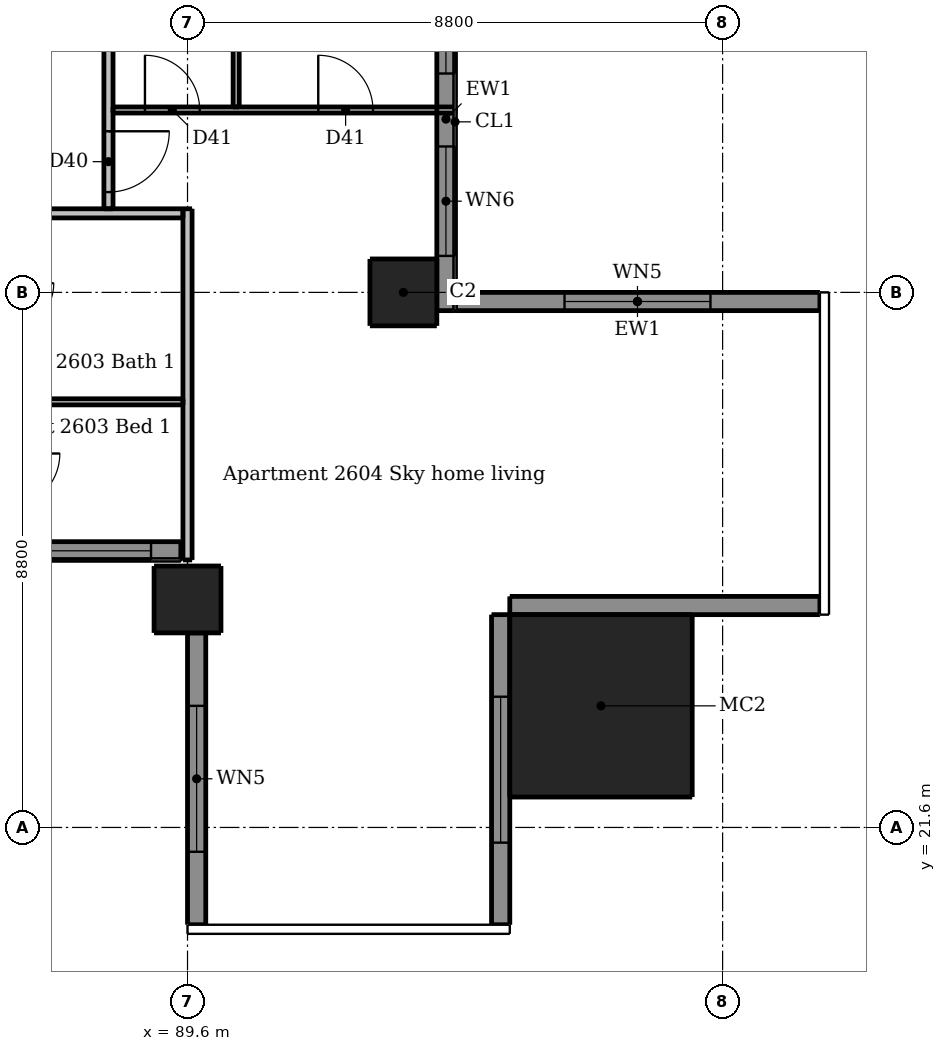
"""IFC4 building model, lengths in metres.
Left out: names, types, materials, properties, quantities, classifications, styles, units other than length and angle.
Written with IfcOpenShell. Run it as: python <this file> out.ifc"""

import sys

from ifc_helpers import new_model, si_unit, direction, frame, frame_2d, origin, origin_2d, place, context, subcontext, project, spatial, rectangle, extrude, element, fill, save


model = new_model("IFC4")
c1 = context("Model", 3, precision=1e-05, world=origin(), true_north=direction((0.0, 1.0)))
c2 = subcontext(c1, "Body", "Model", "MODEL_VIEW")
j1 = project(units=[si_unit("LENGTHUNIT", "METRE"), si_unit("PLANEANGLEUNIT", "RADIAN")], contexts=[c1])
p1 = place(None, origin())
s1 = spatial("IfcSite", under=j1, at=p1, CompositionType="ELEMENT")
p2 = place(p1, origin())
s2 = spatial("IfcBuilding", under=s1, at=p2, CompositionType="ELEMENT")
p3 = place(p2, frame((0.0, 0.0, 98.5)))
s3 = spatial("IfcBuildingStorey", under=s2, at=p3, CompositionType="ELEMENT", Elevation=98.5)
for number, where, z_axis, x_axis in (
    (1, (89.6, 25.35, 0.0), (0.0, 0.0, 1.0), (1.0, 0.0, 0.0)),
    (2, (93.15, 30.4, 0.0), (0.0, 0.0, 1.0), (1.0, 0.0, 0.0)),
):
    element("IfcColumn", number, at=place(p3, frame(where, z_axis=z_axis, x_axis=x_axis)), inside=s3, PredefinedType="COLUMN", context=c2, shape_type="SweptSolid", body=[
        extrude(rectangle(XDim=1.1, YDim=1.1, at=origin_2d()), origin(), (0.0, 0.0, 1.0), 3.05),
    ])
p4 = place(p3, frame((96.4, 23.6, 0.0), z_axis=(0.0, 0.0, 1.0), x_axis=(1.0, 0.0, 0.0)))
e3 = element("IfcColumn", 3, at=p4, inside=s3, PredefinedType="COLUMN", context=c2, shape_type="SweptSolid", body=[
    extrude(rectangle(XDim=3.0, YDim=3.0, at=origin_2d()), origin(), (0.0, 0.0, 1.0), 3.3),
])
p5 = place(p3, frame((89.75, 24.8, 0.0), z_axis=(0.0, 0.0, 1.0), x_axis=(0.0, -1.0, 0.0)))
e4 = element("IfcWall", 4, at=p5, inside=s3, PredefinedType="SOLIDWALL", context=c2, shape_type="SweptSolid", body=[
    extrude(rectangle(XDim=4.8, YDim=0.3, at=frame_2d((2.4, 0.0))), origin(), (0.0, 0.0, 1.0), 3.05),
])
p6 = place(p5, frame((1.2, 0.0, 0.15)))
e5 = element("IfcOpeningElement", 5, at=p6, cuts=e4, PredefinedType="OPENING", context=c2, shape_type="SweptSolid", body=[
    extrude(rectangle(XDim=2.4, YDim=2.1, at=frame_2d((1.2, 1.05))), frame((0.0, 0.16, 0.0), z_axis=(0.0, -1.0, 0.0), x_axis=(1.0, 0.0, 0.0)), (0.0, 0.0, 1.0), 0.32),
])
p7 = place(p3, frame((94.75, 20.0, 0.0), z_axis=(0.0, 0.0, 1.0), x_axis=(0.0, 1.0, 0.0)))
e6 = element("IfcWall", 6, at=p7, inside=s3, PredefinedType="SOLIDWALL", context=c2, shape_type="SweptSolid", body=[
    extrude(rectangle(XDim=5.1, YDim=0.3, at=frame_2d((2.55, 0.0))), origin(), (0.0, 0.0, 1.0), 3.05),
])
p8 = place(p7, frame((1.35, 0.0, 0.15)))
e7 = element("IfcOpeningElement", 7, at=p8, cuts=e6, PredefinedType="OPENING", context=c2, shape_type="SweptSolid", body=[
    extrude(rectangle(XDim=2.4, YDim=2.1, at=frame_2d((1.2, 1.05))), frame((0.0, 0.16, 0.0), z_axis=(0.0, -1.0, 0.0), x_axis=(1.0, 0.0, 0.0)), (0.0, 0.0, 1.0), 0.32),
])
p9 = place(p3, frame((94.9, 25.25, 0.0), z_axis=(0.0, 0.0, 1.0), x_axis=(1.0, 0.0, 0.0)))
e8 = element("IfcWall", 8, at=p9, inside=s3, PredefinedType="SOLIDWALL", context=c2, shape_type="SweptSolid", body=[
    extrude(rectangle(XDim=5.1, YDim=0.3, at=frame_2d((2.55, 0.0))), origin(), (0.0, 0.0, 1.0), 3.05),
])
p10 = place(p3, frame((100.0, 30.25, 0.0), z_axis=(0.0, 0.0, 1.0), x_axis=(-1.0, 0.0, 0.0)))
e9 = element("IfcWall", 9, at=p10, inside=s3, PredefinedType="SOLIDWALL", context=c2, shape_type="SweptSolid", body=[
    extrude(rectangle(XDim=6.0, YDim=0.3, at=frame_2d((3.0, 0.0))), origin(), (0.0, 0.0, 1.0), 3.05),
])
p11 = place(p10, frame((1.8, 0.0, 0.15)))
e10 = element("IfcOpeningElement", 10, at=p11, cuts=e9, PredefinedType="OPENING", context=c2, shape_type="SweptSolid", body=[
    extrude(rectangle(XDim=2.4, YDim=2.1, at=frame_2d((1.2, 1.05))), frame((0.0, 0.16, 0.0), z_axis=(0.0, -1.0, 0.0), x_axis=(1.0, 0.0, 0.0)), (0.0, 0.0, 1.0), 0.32),
])
p12 = place(p3, frame((83.7, 26.15, 0.0), z_axis=(0.0, 0.0, 1.0), x_axis=(1.0, 0.0, 0.0)))
e11 = element("IfcWall", 11, at=p12, inside=s3, PredefinedType="SOLIDWALL", context=c2, shape_type="SweptSolid", body=[
    extrude(rectangle(XDim=5.79, YDim=0.3, at=frame_2d((2.895, 0.0))), origin(), (0.0, 0.0, 1.0), 3.05),
])
p13 = place(p12, frame((0.5, 0.0, 0.15)))
e12 = element("IfcOpeningElement", 12, at=p13, cuts=e11, PredefinedType="OPENING", context=c2, shape_type="SweptSolid", body=[
    extrude(rectangle(XDim=1.8, YDim=2.1, at=frame_2d((0.9, 1.05))), frame((0.0, 0.16, 0.0), z_axis=(0.0, -1.0, 0.0), x_axis=(1.0, 0.0, 0.0)), (0.0, 0.0, 1.0), 0.32),
])
p14 = place(p12, frame((3.5, 0.0, 0.15)))
e13 = element("IfcOpeningElement", 13, at=p14, cuts=e11, PredefinedType="OPENING", context=c2, shape_type="SweptSolid", body=[
    extrude(rectangle(XDim=1.8, YDim=2.1, at=frame_2d((0.9, 1.05))), frame((0.0, 0.16, 0.0), z_axis=(0.0, -1.0, 0.0), x_axis=(1.0, 0.0, 0.0)), (0.0, 0.0, 1.0), 0.32),
])
p15 = place(p3, frame((93.85, 30.1, 0.0), z_axis=(0.0, 0.0, 1.0), x_axis=(0.0, 1.0, 0.0)))
e14 = element("IfcWall", 14, at=p15, inside=s3, PredefinedType="SOLIDWALL", context=c2, shape_type="SweptSolid", body=[
    extrude(rectangle(XDim=6.3, YDim=0.3, at=frame_2d((3.15, 0.0))), origin(), (0.0, 0.0, 1.0), 3.05),
])
p16 = place(p15, frame((0.9, 0.0, 0.15)))
e15 = element("IfcOpeningElement", 15, at=p16, cuts=e14, PredefinedType="OPENING", context=c2, shape_type="SweptSolid", body=[
    extrude(rectangle(XDim=1.8, YDim=2.1, at=frame_2d((0.9, 1.05))), frame((0.0, 0.16, 0.0), z_axis=(0.0, -1.0, 0.0), x_axis=(1.0, 0.0, 0.0)), (0.0, 0.0, 1.0), 0.32),
])
p17 = place(p15, frame((3.9, 0.0, 0.15)))
e16 = element("IfcOpeningElement", 16, at=p17, cuts=e14, PredefinedType="OPENING", context=c2, shape_type="SweptSolid", body=[
    extrude(rectangle(XDim=1.8, YDim=2.1, at=frame_2d((0.9, 1.05))), frame((0.0, 0.16, 0.0), z_axis=(0.0, -1.0, 0.0), x_axis=(1.0, 0.0, 0.0)), (0.0, 0.0, 1.0), 0.32),
])
p18 = place(p3, frame((90.4, 33.45, 0.0), z_axis=(0.0, 0.0, 1.0), x_axis=(0.0, 1.0, 0.0)))
e17 = element("IfcWall", 17, at=p18, inside=s3, PredefinedType="PARTITIONING", context=c2, shape_type="SweptSolid", body=[
    extrude(rectangle(XDim=8.9, YDim=0.1, at=frame_2d((4.45, 0.0))), origin(), (0.0, 0.0, 1.0), 3.05),
])
p19 = place(p18, frame((3.75, 0.0, 0.0)))
e18 = element("IfcOpeningElement", 18, at=p19, cuts=e17, PredefinedType="OPENING", context=c2, shape_type="SweptSolid", body=[
    extrude(rectangle(XDim=0.8, YDim=2.1, at=frame_2d((0.4, 1.05))), frame((0.0, 0.06, 0.0), z_axis=(0.0, -1.0, 0.0), x_axis=(1.0, 0.0, 0.0)), (0.0, 0.0, 1.0), 0.12),
])
p20 = place(p3, frame((88.375, 33.4, 0.0), z_axis=(0.0, 0.0, 1.0), x_axis=(1.0, 0.0, 0.0)))
e19 = element("IfcWall", 19, at=p20, inside=s3, PredefinedType="PARTITIONING", context=c2, shape_type="SweptSolid", body=[
    extrude(rectangle(XDim=5.625, YDim=0.1, at=frame_2d((2.812, 0.0))), origin(), (0.0, 0.0, 1.0), 3.05),
])
p21 = place(p20, frame((0.525, 0.0, 0.0)))
e20 = element("IfcOpeningElement", 20, at=p21, cuts=e19, PredefinedType="OPENING", context=c2, shape_type="SweptSolid", body=[
    extrude(rectangle(XDim=0.9, YDim=2.1, at=frame_2d((0.45, 1.05))), frame((0.0, 0.06, 0.0), z_axis=(0.0, -1.0, 0.0), x_axis=(1.0, 0.0, 0.0)), (0.0, 0.0, 1.0), 0.12),
])
p22 = place(p20, frame((3.375, 0.0, 0.0)))
e21 = element("IfcOpeningElement", 21, at=p22, cuts=e19, PredefinedType="OPENING", context=c2, shape_type="SweptSolid", body=[
    extrude(rectangle(XDim=0.9, YDim=2.1, at=frame_2d((0.45, 1.05))), frame((0.0, 0.06, 0.0), z_axis=(0.0, -1.0, 0.0), x_axis=(1.0, 0.0, 0.0)), (0.0, 0.0, 1.0), 0.12),
])
p23 = place(p3, frame((86.65, 28.6, 0.0), z_axis=(0.0, 0.0, 1.0), x_axis=(1.0, 0.0, 0.0)))
e22 = element("IfcWall", 22, at=p23, inside=s3, PredefinedType="PARTITIONING", context=c2, shape_type="SweptSolid", body=[
    extrude(rectangle(XDim=2.875, YDim=0.1, at=frame_2d((1.438, 0.0))), origin(), (0.0, 0.0, 1.0), 3.05),
])
p24 = place(p3, frame((88.3, 60.475, 0.0), z_axis=(0.0, 0.0, 1.0), x_axis=(0.0, -1.0, 0.0)))
e23 = element("IfcWall", 23, at=p24, inside=s3, PredefinedType="PARTITIONING", context=c2, shape_type="SweptSolid", body=[
    extrude(rectangle(XDim=28.7, YDim=0.15, at=frame_2d((14.35, 0.0))), origin(), (0.0, 0.0, 1.0), 3.05),
])
p25 = place(p24, frame((27.425, 0.0, 0.0)))
e24 = element("IfcOpeningElement", 24, at=p25, cuts=e23, PredefinedType="OPENING", context=c2, shape_type="SweptSolid", body=[
    extrude(rectangle(XDim=1.0, YDim=2.1, at=frame_2d((0.5, 1.05))), frame((0.0, 0.085, 0.0), z_axis=(0.0, -1.0, 0.0), x_axis=(1.0, 0.0, 0.0)), (0.0, 0.0, 1.0), 0.17),
])
p26 = place(p24, frame((14.575, 0.0, 0.0)))
e25 = element("IfcOpeningElement", 25, at=p26, cuts=e23, PredefinedType="OPENING", context=c2, shape_type="SweptSolid", body=[
    extrude(rectangle(XDim=1.0, YDim=2.1, at=frame_2d((0.5, 1.05))), frame((0.0, 0.085, 0.0), z_axis=(0.0, -1.0, 0.0), x_axis=(1.0, 0.0, 0.0)), (0.0, 0.0, 1.0), 0.17),
])
p27 = place(p24, frame((3.775, 0.0, 0.0)))
e26 = element("IfcOpeningElement", 26, at=p27, cuts=e23, PredefinedType="OPENING", context=c2, shape_type="SweptSolid", body=[
    extrude(rectangle(XDim=1.0, YDim=2.1, at=frame_2d((0.5, 1.05))), frame((0.0, 0.085, 0.0), z_axis=(0.0, -1.0, 0.0), x_axis=(1.0, 0.0, 0.0)), (0.0, 0.0, 1.0), 0.17),
])
p28 = place(p3, frame((89.6, 26.0, 0.0), z_axis=(0.0, 0.0, 1.0), x_axis=(0.0, 1.0, 0.0)))
e27 = element("IfcWall", 27, at=p28, inside=s3, PredefinedType="PARTITIONING", context=c2, shape_type="SweptSolid", body=[
    extrude(rectangle(XDim=5.775, YDim=0.15, at=frame_2d((2.887, 0.0))), origin(), (0.0, 0.0, 1.0), 2.516),
])
p29 = place(p3, frame((89.525, 31.7, 0.0), z_axis=(0.0, 0.0, 1.0), x_axis=(-1.0, 0.0, 0.0)))
e28 = element("IfcWall", 28, at=p29, inside=s3, PredefinedType="PARTITIONING", context=c2, shape_type="SweptSolid", body=[
    extrude(rectangle(XDim=28.75, YDim=0.15, at=frame_2d((14.375, 0.0))), origin(), (0.0, 0.0, 1.0), 3.05),
])
p30 = place(p29, frame((25.875, 0.0, 0.0)))
e29 = element("IfcOpeningElement", 29, at=p30, cuts=e28, PredefinedType="OPENING", context=c2, shape_type="SweptSolid", body=[
    extrude(rectangle(XDim=1.0, YDim=2.1, at=frame_2d((0.5, 1.05))), frame((0.0, 0.085, 0.0), z_axis=(0.0, -1.0, 0.0), x_axis=(1.0, 0.0, 0.0)), (0.0, 0.0, 1.0), 0.17),
])
p31 = place(p29, frame((12.525, 0.0, 0.0)))
e30 = element("IfcOpeningElement", 30, at=p31, cuts=e28, PredefinedType="OPENING", context=c2, shape_type="SweptSolid", body=[
    extrude(rectangle(XDim=1.0, YDim=2.1, at=frame_2d((0.5, 1.05))), frame((0.0, 0.085, 0.0), z_axis=(0.0, -1.0, 0.0), x_axis=(1.0, 0.0, 0.0)), (0.0, 0.0, 1.0), 0.17),
])
p32 = place(p29, frame((4.175, 0.0, 0.0)))
e31 = element("IfcOpeningElement", 31, at=p32, cuts=e28, PredefinedType="OPENING", context=c2, shape_type="SweptSolid", body=[
    extrude(rectangle(XDim=1.0, YDim=2.1, at=frame_2d((0.5, 1.05))), frame((0.0, 0.085, 0.0), z_axis=(0.0, -1.0, 0.0), x_axis=(1.0, 0.0, 0.0)), (0.0, 0.0, 1.0), 0.17),
])
p33 = place(p6, origin())
e32 = element("IfcWindow", 32, at=p33, inside=s3, PartitioningType="DOUBLE_PANEL_VERTICAL", PredefinedType="WINDOW", context=c2, shape_type="SweptSolid", body=[
    extrude(rectangle(XDim=2.4, YDim=2.1, at=frame_2d((1.2, 1.05))), frame((0.0, 0.03, 0.0), z_axis=(0.0, -1.0, 0.0), x_axis=(1.0, 0.0, 0.0)), (0.0, 0.0, 1.0), 0.06),
])
fill(e5, e32)
p34 = place(p8, origin())
e33 = element("IfcWindow", 33, at=p34, inside=s3, PartitioningType="DOUBLE_PANEL_VERTICAL", PredefinedType="WINDOW", context=c2, shape_type="SweptSolid", body=[
    extrude(rectangle(XDim=2.4, YDim=2.1, at=frame_2d((1.2, 1.05))), frame((0.0, 0.03, 0.0), z_axis=(0.0, -1.0, 0.0), x_axis=(1.0, 0.0, 0.0)), (0.0, 0.0, 1.0), 0.06),
])
fill(e7, e33)
p35 = place(p11, origin())
e34 = element("IfcWindow", 34, at=p35, inside=s3, PartitioningType="DOUBLE_PANEL_VERTICAL", PredefinedType="WINDOW", context=c2, shape_type="SweptSolid", body=[
    extrude(rectangle(XDim=2.4, YDim=2.1, at=frame_2d((1.2, 1.05))), frame((0.0, 0.03, 0.0), z_axis=(0.0, -1.0, 0.0), x_axis=(1.0, 0.0, 0.0)), (0.0, 0.0, 1.0), 0.06),
])
fill(e10, e34)
p36 = place(p14, origin())
e35 = element("IfcWindow", 35, at=p36, inside=s3, PartitioningType="DOUBLE_PANEL_VERTICAL", PredefinedType="WINDOW", context=c2, shape_type="SweptSolid", body=[
    extrude(rectangle(XDim=1.8, YDim=2.1, at=frame_2d((0.9, 1.05))), frame((0.0, 0.03, 0.0), z_axis=(0.0, -1.0, 0.0), x_axis=(1.0, 0.0, 0.0)), (0.0, 0.0, 1.0), 0.06),
])
fill(e13, e35)
p37 = place(p16, origin())
e36 = element("IfcWindow", 36, at=p37, inside=s3, PartitioningType="DOUBLE_PANEL_VERTICAL", PredefinedType="WINDOW", context=c2, shape_type="SweptSolid", body=[
    extrude(rectangle(XDim=1.8, YDim=2.1, at=frame_2d((0.9, 1.05))), frame((0.0, 0.03, 0.0), z_axis=(0.0, -1.0, 0.0), x_axis=(1.0, 0.0, 0.0)), (0.0, 0.0, 1.0), 0.06),
])
fill(e15, e36)
p38 = place(p17, origin())
e37 = element("IfcWindow", 37, at=p38, inside=s3, PartitioningType="DOUBLE_PANEL_VERTICAL", PredefinedType="WINDOW", context=c2, shape_type="SweptSolid", body=[
    extrude(rectangle(XDim=1.8, YDim=2.1, at=frame_2d((0.9, 1.05))), frame((0.0, 0.03, 0.0), z_axis=(0.0, -1.0, 0.0), x_axis=(1.0, 0.0, 0.0)), (0.0, 0.0, 1.0), 0.06),
])
fill(e16, e37)
p39 = place(p25, origin())
e38 = element("IfcDoor", 38, at=p39, inside=s3, OperationType="SINGLE_SWING_LEFT", PredefinedType="DOOR", context=c2, shape_type="SweptSolid", body=[
    extrude(rectangle(XDim=1.0, YDim=2.1, at=frame_2d((0.5, 1.05))), frame((0.0, 0.025, 0.0), z_axis=(0.0, -1.0, 0.0), x_axis=(1.0, 0.0, 0.0)), (0.0, 0.0, 1.0), 0.05),
])
fill(e24, e38)
p40 = place(p21, origin())
e39 = element("IfcDoor", 39, at=p40, inside=s3, OperationType="SINGLE_SWING_LEFT", PredefinedType="DOOR", context=c2, shape_type="SweptSolid", body=[
    extrude(rectangle(XDim=0.9, YDim=2.1, at=frame_2d((0.45, 1.05))), frame((0.0, 0.025, 0.0), z_axis=(0.0, -1.0, 0.0), x_axis=(1.0, 0.0, 0.0)), (0.0, 0.0, 1.0), 0.05),
])
fill(e20, e39)
p41 = place(p22, origin())
e40 = element("IfcDoor", 40, at=p41, inside=s3, OperationType="SINGLE_SWING_LEFT", PredefinedType="DOOR", context=c2, shape_type="SweptSolid", body=[
    extrude(rectangle(XDim=0.9, YDim=2.1, at=frame_2d((0.45, 1.05))), frame((0.0, 0.025, 0.0), z_axis=(0.0, -1.0, 0.0), x_axis=(1.0, 0.0, 0.0)), (0.0, 0.0, 1.0), 0.05),
])
fill(e21, e40)
save(model, sys.argv[1])
